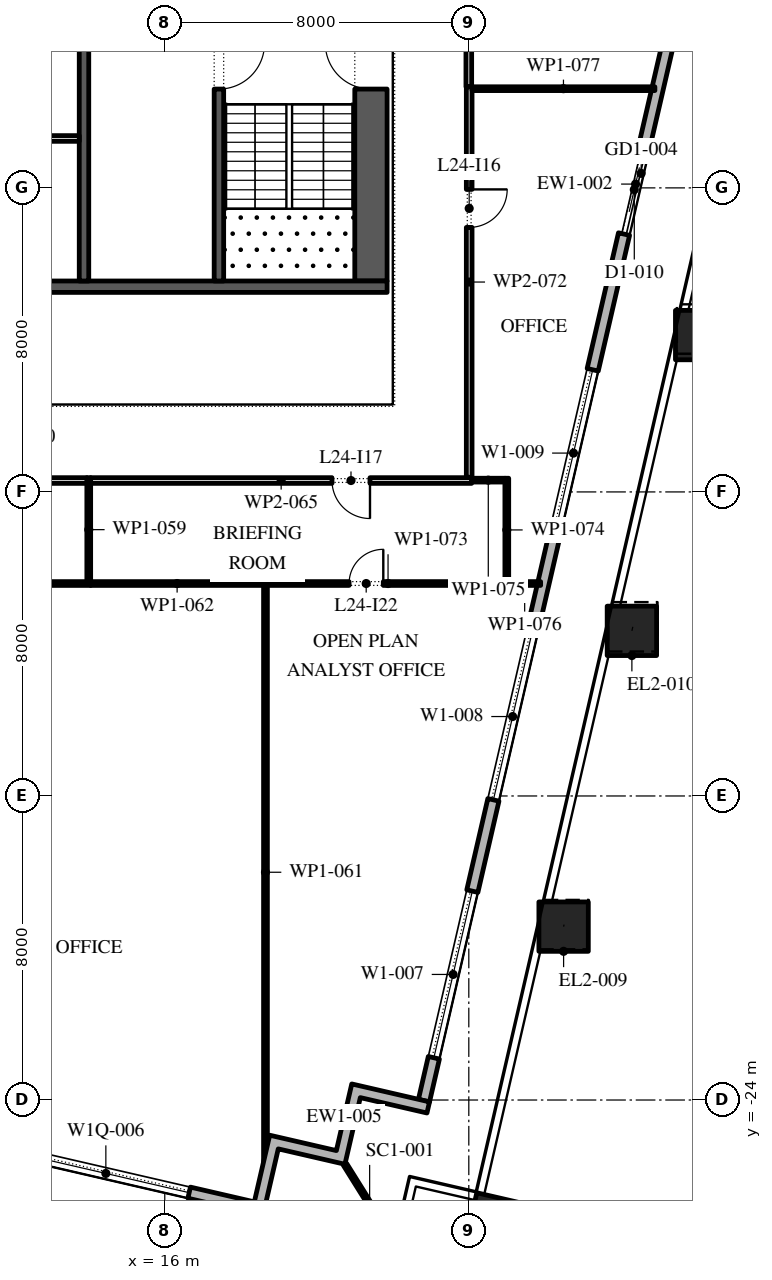
"""IFC4 building model, lengths in metres.
Left out: names, types, materials, properties, quantities, classifications, styles, units other than length and angle.
Written with IfcOpenShell. Run it as: python <this file> out.ifc"""

import sys

from ifc_helpers import new_model, si_unit, direction, frame, frame_2d, origin, origin_2d, place, context, subcontext, project, spatial, polyline, rectangle, outline, extrude, element, fill, save


model = new_model("IFC4")
c1 = context("Model", 3, precision=1e-05, world=origin(), true_north=direction((0.0, 1.0)))
c2 = subcontext(c1, "Body", "Model", "MODEL_VIEW")
j1 = project(units=[si_unit("LENGTHUNIT", "METRE"), si_unit("PLANEANGLEUNIT", "RADIAN")], contexts=[c1])
p1 = place(None, origin())
s1 = spatial("IfcSite", under=j1, at=p1, CompositionType="ELEMENT")
p2 = place(p1, origin())
s2 = spatial("IfcBuilding", under=s1, at=p2, CompositionType="ELEMENT")
p3 = place(p2, frame((0.0, 0.0, 114.0)))
s3 = spatial("IfcBuildingStorey", under=s2, at=p3, CompositionType="ELEMENT", Elevation=114.0)
p4 = place(p3, frame((24.698, -27.22, 0.0), z_axis=(0.0, 0.0, 1.0), x_axis=(0.974370064785, -0.224951054344, 0.0)))
e1 = element("IfcColumn", 1, at=p4, inside=s3, PredefinedType="COLUMN", context=c2, shape_type="SweptSolid", body=[
    extrude(rectangle(XDim=1.3, YDim=1.3, at=origin_2d()), origin(), (0.0, 0.0, 1.0), 4.2),
])
p5 = place(p3, frame((26.494, -19.438, 0.0), z_axis=(0.002906224189, 0.012671137464, 0.999915494498), x_axis=(-0.974691740237, 0.22355315143, 0.0)))
e2 = element("IfcColumn", 2, at=p5, inside=s3, PredefinedType="COLUMN", context=c2, shape_type="SweptSolid", body=[
    extrude(rectangle(XDim=1.3, YDim=1.3, at=origin_2d()), origin(), (0.0, 0.0, 1.0), 4.2),
])
p6 = place(p3, frame((28.291, -11.656, 0.0), z_axis=(0.005869083212, 0.025335844359, 0.999661767226), x_axis=(-0.974202561131, 0.225675363932, 0.0)))
e3 = element("IfcColumn", 3, at=p6, inside=s3, PredefinedType="COLUMN", context=c2, shape_type="SweptSolid", body=[
    extrude(rectangle(XDim=1.3, YDim=1.3, at=origin_2d()), origin(), (0.0, 0.0, 1.0), 4.201),
])
p7 = place(p3, frame((30.088, -3.873, 0.0), z_axis=(0.008770884695, 0.037929719907, 0.99924191662), x_axis=(-0.974290512438, 0.225295355862, 0.0)))
e4 = element("IfcColumn", 4, at=p7, inside=s3, PredefinedType="COLUMN", context=c2, shape_type="SweptSolid", body=[
    extrude(rectangle(XDim=1.3, YDim=1.3, at=origin_2d()), origin(), (0.0, 0.0, 1.0), 4.203),
])
p8 = place(p3, frame((-31.078, -15.421, 0.0), z_axis=(0.0, 0.0, 1.0), x_axis=(0.974370456532, -0.224949357493, 0.0)))
e5 = element("IfcWall", 5, at=p8, inside=s3, PredefinedType="STANDARD", context=c2, shape_type="SweptSolid", body=[
    extrude(rectangle(XDim=51.0, YDim=0.3, at=frame_2d((25.5, 0.0))), origin(), (0.0, 0.0, 1.0), 4.0),
])
p9 = place(p8, frame((1.875, 0.0, 0.45)))
e6 = element("IfcOpeningElement", 6, at=p9, cuts=e5, PredefinedType="OPENING", context=c2, shape_type="SweptSolid", body=[
    extrude(rectangle(XDim=4.5, YDim=2.65, at=frame_2d((2.25, 1.325))), frame((0.0, 0.16, 0.0), z_axis=(0.0, -1.0, 0.0), x_axis=(1.0, 0.0, 0.0)), (0.0, 0.0, 1.0), 0.32),
])
p10 = place(p8, frame((10.275, 0.0, 0.45)))
e7 = element("IfcOpeningElement", 7, at=p10, cuts=e5, PredefinedType="OPENING", context=c2, shape_type="SweptSolid", body=[
    extrude(rectangle(XDim=4.5, YDim=2.525, at=frame_2d((2.25, 1.262))), frame((0.0, 0.16, 0.0), z_axis=(0.0, -1.0, 0.0), x_axis=(1.0, 0.0, 0.0)), (0.0, 0.0, 1.0), 0.32),
])
p11 = place(p8, frame((18.825, 0.0, 0.45)))
e8 = element("IfcOpeningElement", 8, at=p11, cuts=e5, PredefinedType="OPENING", context=c2, shape_type="SweptSolid", body=[
    extrude(rectangle(XDim=4.5, YDim=2.5, at=frame_2d((2.25, 1.25))), frame((0.0, 0.16, 0.0), z_axis=(0.0, -1.0, 0.0), x_axis=(1.0, 0.0, 0.0)), (0.0, 0.0, 1.0), 0.32),
])
p12 = place(p8, frame((27.075, 0.0, 0.0)))
e9 = element("IfcOpeningElement", 9, at=p12, cuts=e5, PredefinedType="OPENING", context=c2, shape_type="SweptSolid", body=[
    extrude(rectangle(XDim=2.4, YDim=2.9, at=frame_2d((1.2, 1.45))), frame((0.0, 0.16, 0.0), z_axis=(0.0, -1.0, 0.0), x_axis=(1.0, 0.0, 0.0)), (0.0, 0.0, 1.0), 0.32),
])
p13 = place(p8, frame((35.925, 0.0, 0.45)))
e10 = element("IfcOpeningElement", 10, at=p13, cuts=e5, PredefinedType="OPENING", context=c2, shape_type="SweptSolid", body=[
    extrude(rectangle(XDim=4.5, YDim=2.45, at=frame_2d((2.25, 1.225))), frame((0.0, 0.16, 0.0), z_axis=(0.0, -1.0, 0.0), x_axis=(1.0, 0.0, 0.0)), (0.0, 0.0, 1.0), 0.32),
])
p14 = place(p8, frame((44.475, 0.0, 0.45)))
e11 = element("IfcOpeningElement", 11, at=p14, cuts=e5, PredefinedType="OPENING", context=c2, shape_type="SweptSolid", body=[
    extrude(rectangle(XDim=4.5, YDim=2.45, at=frame_2d((2.25, 1.225))), frame((0.0, 0.16, 0.0), z_axis=(0.0, -1.0, 0.0), x_axis=(1.0, 0.0, 0.0)), (0.0, 0.0, 1.0), 0.32),
])
p15 = place(p3, frame((22.82, -24.016, 0.0), z_axis=(0.0, 0.0, 1.0), x_axis=(0.224953880882, 0.974369412223, 0.0)))
e12 = element("IfcWall", 12, at=p15, inside=s3, PredefinedType="STANDARD", context=c2, shape_type="SweptSolid", body=[
    extrude(rectangle(XDim=49.5, YDim=0.3, at=frame_2d((24.75, 0.0))), origin(), (0.0, 0.0, 1.0), 4.0),
])
p16 = place(p15, frame((1.157, 0.0, 0.45)))
e13 = element("IfcOpeningElement", 13, at=p16, cuts=e12, PredefinedType="OPENING", context=c2, shape_type="SweptSolid", body=[
    extrude(rectangle(XDim=4.5, YDim=3.05, at=frame_2d((2.25, 1.525))), frame((0.0, 0.16, 0.0), z_axis=(0.0, -1.0, 0.0), x_axis=(1.0, 0.0, 0.0)), (0.0, 0.0, 1.0), 0.32),
])
p17 = place(p15, frame((8.121, 0.0, 0.45)))
e14 = element("IfcOpeningElement", 14, at=p17, cuts=e12, PredefinedType="OPENING", context=c2, shape_type="SweptSolid", body=[
    extrude(rectangle(XDim=4.5, YDim=3.05, at=frame_2d((2.25, 1.525))), frame((0.0, 0.16, 0.0), z_axis=(0.0, -1.0, 0.0), x_axis=(1.0, 0.0, 0.0)), (0.0, 0.0, 1.0), 0.32),
])
p18 = place(p15, frame((15.236, 0.0, 0.45)))
e15 = element("IfcOpeningElement", 15, at=p18, cuts=e12, PredefinedType="OPENING", context=c2, shape_type="SweptSolid", body=[
    extrude(rectangle(XDim=4.5, YDim=3.05, at=frame_2d((2.25, 1.525))), frame((0.0, 0.16, 0.0), z_axis=(0.0, -1.0, 0.0), x_axis=(1.0, 0.0, 0.0)), (0.0, 0.0, 1.0), 0.32),
])
p19 = place(p15, frame((23.4, 0.0, 0.0)))
e16 = element("IfcOpeningElement", 16, at=p19, cuts=e12, PredefinedType="OPENING", context=c2, shape_type="SweptSolid", body=[
    extrude(rectangle(XDim=2.4, YDim=3.5, at=frame_2d((1.2, 1.75))), frame((0.0, 0.16, 0.0), z_axis=(0.0, -1.0, 0.0), x_axis=(1.0, 0.0, 0.0)), (0.0, 0.0, 1.0), 0.32),
])
p20 = place(p15, frame((29.464, 0.0, 0.45)))
e17 = element("IfcOpeningElement", 17, at=p20, cuts=e12, PredefinedType="OPENING", context=c2, shape_type="SweptSolid", body=[
    extrude(rectangle(XDim=4.5, YDim=2.875, at=frame_2d((2.25, 1.438))), frame((0.0, 0.16, 0.0), z_axis=(0.0, -1.0, 0.0), x_axis=(1.0, 0.0, 0.0)), (0.0, 0.0, 1.0), 0.32),
])
p21 = place(p15, frame((36.579, 0.0, 0.45)))
e18 = element("IfcOpeningElement", 18, at=p21, cuts=e12, PredefinedType="OPENING", context=c2, shape_type="SweptSolid", body=[
    extrude(rectangle(XDim=4.5, YDim=2.825, at=frame_2d((2.25, 1.413))), frame((0.0, 0.16, 0.0), z_axis=(0.0, -1.0, 0.0), x_axis=(1.0, 0.0, 0.0)), (0.0, 0.0, 1.0), 0.32),
])
p22 = place(p15, frame((43.693, 0.0, 0.45)))
e19 = element("IfcOpeningElement", 19, at=p22, cuts=e12, PredefinedType="OPENING", context=c2, shape_type="SweptSolid", body=[
    extrude(rectangle(XDim=4.5, YDim=2.75, at=frame_2d((2.25, 1.375))), frame((0.0, 0.16, 0.0), z_axis=(0.0, -1.0, 0.0), x_axis=(1.0, 0.0, 0.0)), (0.0, 0.0, 1.0), 0.32),
])
p23 = place(p3, origin())
e20 = element("IfcWall", 20, at=p23, inside=s3, PredefinedType="STANDARD", context=c2, shape_type="SweptSolid", body=[
    extrude(outline(polyline([(20.515, -25.331), (20.92, -23.577), (22.967, -24.049), (22.899, -24.342), (21.145, -23.937), (20.74, -25.691), (18.986, -25.286), (18.649, -26.747), (18.357, -26.68), (18.762, -24.926), (20.515, -25.331)])), origin(), (0.0, 0.0, 1.0), 4.0),
])
p24 = place(p3, frame((20.74, -25.691, -0.05), z_axis=(0.0, 0.0, 1.0), x_axis=(0.529972121605, -0.848015064914, 0.0)))
e21 = element("IfcWall", 21, at=p24, inside=s3, PredefinedType="STANDARD", context=c2, shape_type="SweptSolid", body=[
    extrude(rectangle(XDim=2.455, YDim=0.1, at=frame_2d((1.228, 0.0))), origin(), (0.0, 0.0, 1.0), 4.05),
])
p25 = place(p3, frame((21.425, -2.45, 0.0), z_axis=(0.0, 0.0, 1.0), x_axis=(0.0, 1.0, 0.0)))
e22 = element("IfcWall", 22, at=p25, inside=s3, PredefinedType="SHEAR", context=c2, shape_type="SweptSolid", body=[
    extrude(rectangle(XDim=27.9, YDim=0.85, at=frame_2d((13.95, 0.0))), origin(), (0.0, 0.0, 1.0), 4.0),
])
p26 = place(p25, frame((5.05, 0.0, 0.0)))
e23 = element("IfcOpeningElement", 23, at=p26, cuts=e22, PredefinedType="OPENING", context=c2, shape_type="SweptSolid", body=[
    extrude(rectangle(XDim=1.2, YDim=2.1, at=frame_2d((0.6, 1.05))), frame((0.0, 0.435, 0.0), z_axis=(0.0, -1.0, 0.0), x_axis=(1.0, 0.0, 0.0)), (0.0, 0.0, 1.0), 0.87),
])
p27 = place(p25, frame((21.65, 0.0, 0.0)))
e24 = element("IfcOpeningElement", 24, at=p27, cuts=e22, PredefinedType="OPENING", context=c2, shape_type="SweptSolid", body=[
    extrude(rectangle(XDim=1.2, YDim=2.1, at=frame_2d((0.6, 1.05))), frame((0.0, 0.435, 0.0), z_axis=(0.0, -1.0, 0.0), x_axis=(1.0, 0.0, 0.0)), (0.0, 0.0, 1.0), 0.87),
])
p28 = place(p3, frame((10.15, -2.6, 0.0), z_axis=(0.0, 0.0, 1.0), x_axis=(1.0, 0.0, 0.0)))
e25 = element("IfcWall", 25, at=p28, inside=s3, PredefinedType="SHEAR", context=c2, shape_type="SweptSolid", body=[
    extrude(rectangle(XDim=11.7, YDim=0.3, at=frame_2d((5.85, 0.0))), origin(), (0.0, 0.0, 1.0), 4.0),
])
p29 = place(p3, frame((17.425, -2.45, 0.0), z_axis=(0.0, 0.0, 1.0), x_axis=(0.0, 1.0, 0.0)))
e26 = element("IfcWall", 26, at=p29, inside=s3, PredefinedType="SHEAR", context=c2, shape_type="SweptSolid", body=[
    extrude(rectangle(XDim=6.3, YDim=0.25, at=frame_2d((3.15, 0.0))), origin(), (0.0, 0.0, 1.0), 4.0),
])
p30 = place(p29, frame((5.05, 0.0, 0.0)))
e27 = element("IfcOpeningElement", 27, at=p30, cuts=e26, PredefinedType="OPENING", context=c2, shape_type="SweptSolid", body=[
    extrude(rectangle(XDim=1.2, YDim=2.1, at=frame_2d((0.6, 1.05))), frame((0.0, 0.135, 0.0), z_axis=(0.0, -1.0, 0.0), x_axis=(1.0, 0.0, 0.0)), (0.0, 0.0, 1.0), 0.27),
])
p31 = place(p3, frame((13.875, -2.45, 0.0), z_axis=(0.0, 0.0, 1.0), x_axis=(0.0, 1.0, 0.0)))
e28 = element("IfcWall", 28, at=p31, inside=s3, PredefinedType="SHEAR", context=c2, shape_type="SweptSolid", body=[
    extrude(rectangle(XDim=21.3, YDim=0.25, at=frame_2d((10.65, 0.0))), origin(), (0.0, 0.0, 1.0), 4.0),
])
p32 = place(p31, frame((11.446, 0.0, 0.0)))
e29 = element("IfcOpeningElement", 29, at=p32, cuts=e28, PredefinedType="OPENING", context=c2, shape_type="SweptSolid", body=[
    extrude(rectangle(XDim=0.9, YDim=2.1, at=frame_2d((0.45, 1.05))), frame((0.0, 0.135, 0.0), z_axis=(0.0, -1.0, 0.0), x_axis=(1.0, 0.0, 0.0)), (0.0, 0.0, 1.0), 0.27),
])
p33 = place(p31, frame((17.725, 0.0, 0.0)))
e30 = element("IfcOpeningElement", 30, at=p33, cuts=e28, PredefinedType="OPENING", context=c2, shape_type="SweptSolid", body=[
    extrude(rectangle(XDim=0.9, YDim=2.1, at=frame_2d((0.45, 1.05))), frame((0.0, 0.135, 0.0), z_axis=(0.0, -1.0, 0.0), x_axis=(1.0, 0.0, 0.0)), (0.0, 0.0, 1.0), 0.27),
])
p34 = place(p31, frame((6.971, 0.0, 0.0)))
e31 = element("IfcOpeningElement", 31, at=p34, cuts=e28, PredefinedType="OPENING", context=c2, shape_type="SweptSolid", body=[
    extrude(rectangle(XDim=1.1, YDim=2.1, at=frame_2d((0.55, 1.05))), frame((0.0, 0.135, 0.0), z_axis=(0.0, -1.0, 0.0), x_axis=(1.0, 0.0, 0.0)), (0.0, 0.0, 1.0), 0.27),
])
p35 = place(p3, frame((11.0, 1.3, 0.0), z_axis=(0.0, 0.0, 1.0), x_axis=(1.0, 0.0, 0.0)))
e32 = element("IfcWall", 32, at=p35, inside=s3, PredefinedType="PARTITIONING", context=c2, shape_type="SweptSolid", body=[
    extrude(rectangle(XDim=2.75, YDim=0.15, at=frame_2d((1.375, 0.0))), origin(), (0.0, 0.0, 1.0), 4.0),
])
p36 = place(p3, frame((14.05, -10.41, 0.0), z_axis=(0.0, 0.0, 1.0), x_axis=(-1.0, 0.0, 0.0)))
e33 = element("IfcWall", 33, at=p36, inside=s3, PredefinedType="PARTITIONING", context=c2, shape_type="SweptSolid", body=[
    extrude(rectangle(XDim=7.66, YDim=0.1, at=frame_2d((3.83, 0.0))), origin(), (0.0, 0.0, 1.0), 4.0),
])
p37 = place(p36, frame((3.86, 0.0, 0.0)))
e34 = element("IfcOpeningElement", 34, at=p37, cuts=e33, PredefinedType="OPENING", context=c2, shape_type="SweptSolid", body=[
    extrude(rectangle(XDim=1.6, YDim=2.1, at=frame_2d((0.8, 1.05))), frame((0.0, 0.06, 0.0), z_axis=(0.0, -1.0, 0.0), x_axis=(1.0, 0.0, 0.0)), (0.0, 0.0, 1.0), 0.12),
])
p38 = place(p3, frame((14.0, -10.36, 0.0), z_axis=(0.0, 0.0, 1.0), x_axis=(0.0, 1.0, 0.0)))
e35 = element("IfcWall", 35, at=p38, inside=s3, PredefinedType="PARTITIONING", context=c2, shape_type="SweptSolid", body=[
    extrude(rectangle(XDim=2.735, YDim=0.1, at=frame_2d((1.368, 0.0))), origin(), (0.0, 0.0, 1.0), 4.0),
])
p39 = place(p3, frame((13.95, -7.7, 0.0), z_axis=(0.0, 0.0, 1.0), x_axis=(-1.0, 0.0, 0.0)))
e36 = element("IfcWall", 36, at=p39, inside=s3, PredefinedType="PARTITIONING", context=c2, shape_type="SweptSolid", body=[
    extrude(rectangle(XDim=5.875, YDim=0.15, at=frame_2d((2.938, 0.0))), origin(), (0.0, 0.0, 1.0), 4.0),
])
p40 = place(p3, frame((18.65, -25.654, 0.0), z_axis=(0.0, 0.0, 1.0), x_axis=(0.0, 1.0, 0.0)))
e37 = element("IfcWall", 37, at=p40, inside=s3, PredefinedType="PARTITIONING", context=c2, shape_type="SweptSolid", body=[
    extrude(rectangle(XDim=15.294, YDim=0.1, at=frame_2d((7.647, 0.0))), origin(), (0.0, 0.0, 1.0), 4.0),
])
p41 = place(p3, frame((18.6, -10.41, 0.0), z_axis=(0.0, 0.0, 1.0), x_axis=(-1.0, 0.0, 0.0)))
e38 = element("IfcWall", 38, at=p41, inside=s3, PredefinedType="PARTITIONING", context=c2, shape_type="SweptSolid", body=[
    extrude(rectangle(XDim=4.55, YDim=0.1, at=frame_2d((2.275, 0.0))), origin(), (0.0, 0.0, 1.0), 4.0),
])
p42 = place(p3, frame((24.075, -7.7, 0.0), z_axis=(0.0, 0.0, 1.0), x_axis=(-1.0, 0.0, 0.0)))
e39 = element("IfcWall", 39, at=p42, inside=s3, PredefinedType="PARTITIONING", context=c2, shape_type="SweptSolid", body=[
    extrude(rectangle(XDim=10.025, YDim=0.15, at=frame_2d((5.012, 0.0))), origin(), (0.0, 0.0, 1.0), 4.0),
])
p43 = place(p42, frame((2.675, 0.0, 0.0)))
e40 = element("IfcOpeningElement", 40, at=p43, cuts=e39, PredefinedType="OPENING", context=c2, shape_type="SweptSolid", body=[
    extrude(rectangle(XDim=1.0, YDim=2.1, at=frame_2d((0.5, 1.05))), frame((0.0, 0.085, 0.0), z_axis=(0.0, -1.0, 0.0), x_axis=(1.0, 0.0, 0.0)), (0.0, 0.0, 1.0), 0.17),
])
p44 = place(p3, frame((24.0, 9.5, 0.0), z_axis=(0.0, 0.0, 1.0), x_axis=(0.0, -1.0, 0.0)))
e41 = element("IfcWall", 41, at=p44, inside=s3, PredefinedType="PARTITIONING", context=c2, shape_type="SweptSolid", body=[
    extrude(rectangle(XDim=6.84, YDim=0.15, at=frame_2d((3.42, 0.0))), origin(), (0.0, 0.0, 1.0), 4.0),
])
p45 = place(p44, frame((4.24, 0.0, 0.0)))
e42 = element("IfcOpeningElement", 42, at=p45, cuts=e41, PredefinedType="OPENING", context=c2, shape_type="SweptSolid", body=[
    extrude(rectangle(XDim=1.0, YDim=2.1, at=frame_2d((0.5, 1.05))), frame((0.0, 0.085, 0.0), z_axis=(0.0, -1.0, 0.0), x_axis=(1.0, 0.0, 0.0)), (0.0, 0.0, 1.0), 0.17),
])
p46 = place(p3, frame((24.01, 2.66, 0.0), z_axis=(0.0, 0.0, 1.0), x_axis=(0.0, -1.0, 0.0)))
e43 = element("IfcWall", 43, at=p46, inside=s3, PredefinedType="PARTITIONING", context=c2, shape_type="SweptSolid", body=[
    extrude(rectangle(XDim=10.275, YDim=0.15, at=frame_2d((5.137, 0.0))), origin(), (0.0, 0.0, 1.0), 4.0),
])
p47 = place(p46, frame((2.7, 0.0, 0.0)))
e44 = element("IfcOpeningElement", 44, at=p47, cuts=e43, PredefinedType="OPENING", context=c2, shape_type="SweptSolid", body=[
    extrude(rectangle(XDim=1.0, YDim=2.1, at=frame_2d((0.5, 1.05))), frame((0.0, 0.085, 0.0), z_axis=(0.0, -1.0, 0.0), x_axis=(1.0, 0.0, 0.0)), (0.0, 0.0, 1.0), 0.17),
])
p48 = place(p3, frame((25.05, -10.41, 0.0), z_axis=(0.0, 0.0, 1.0), x_axis=(-1.0, 0.0, 0.0)))
e45 = element("IfcWall", 45, at=p48, inside=s3, PredefinedType="PARTITIONING", context=c2, shape_type="SweptSolid", body=[
    extrude(rectangle(XDim=6.35, YDim=0.1, at=frame_2d((3.175, 0.0))), origin(), (0.0, 0.0, 1.0), 4.0),
])
p49 = place(p48, frame((3.3, 0.0, 0.0)))
e46 = element("IfcOpeningElement", 46, at=p49, cuts=e45, PredefinedType="OPENING", context=c2, shape_type="SweptSolid", body=[
    extrude(rectangle(XDim=0.9, YDim=2.1, at=frame_2d((0.45, 1.05))), frame((0.0, 0.06, 0.0), z_axis=(0.0, -1.0, 0.0), x_axis=(1.0, 0.0, 0.0)), (0.0, 0.0, 1.0), 0.12),
])
p50 = place(p3, frame((25.0, -10.36, 0.0), z_axis=(0.0, 0.0, 1.0), x_axis=(0.0, 1.0, 0.0)))
e47 = element("IfcWall", 47, at=p50, inside=s3, PredefinedType="PARTITIONING", context=c2, shape_type="SweptSolid", body=[
    extrude(rectangle(XDim=2.72, YDim=0.1, at=frame_2d((1.36, 0.0))), origin(), (0.0, 0.0, 1.0), 4.0),
])
p51 = place(p3, frame((24.95, -7.69, 0.0), z_axis=(0.0, 0.0, 1.0), x_axis=(-1.0, 0.0, 0.0)))
e48 = element("IfcWall", 48, at=p51, inside=s3, PredefinedType="PARTITIONING", context=c2, shape_type="SweptSolid", body=[
    extrude(rectangle(XDim=0.875, YDim=0.1, at=frame_2d((0.438, 0.0))), origin(), (0.0, 0.0, 1.0), 4.0),
])
p52 = place(p3, frame((25.89, -10.41, 0.0), z_axis=(0.0, 0.0, 1.0), x_axis=(-1.0, 0.0, 0.0)))
e49 = element("IfcWall", 49, at=p52, inside=s3, PredefinedType="PARTITIONING", context=c2, shape_type="SweptSolid", body=[
    extrude(rectangle(XDim=0.84, YDim=0.1, at=frame_2d((0.42, 0.0))), origin(), (0.0, 0.0, 1.0), 4.0),
])
p53 = place(p3, frame((28.896, 2.61, 0.0), z_axis=(0.0, 0.0, 1.0), x_axis=(-1.0, 0.0, 0.0)))
e50 = element("IfcWall", 50, at=p53, inside=s3, PredefinedType="PARTITIONING", context=c2, shape_type="SweptSolid", body=[
    extrude(rectangle(XDim=4.811, YDim=0.1, at=frame_2d((2.406, 0.0))), origin(), (0.0, 0.0, 1.0), 4.0),
])
p54 = place(p14, origin())
e51 = element("IfcWindow", 51, at=p54, inside=s3, PartitioningType="DOUBLE_PANEL_VERTICAL", PredefinedType="WINDOW", context=c2, shape_type="SweptSolid", body=[
    extrude(rectangle(XDim=4.5, YDim=2.45, at=frame_2d((2.25, 1.225))), frame((0.0, 0.03, 0.0), z_axis=(0.0, -1.0, 0.0), x_axis=(1.0, 0.0, 0.0)), (0.0, 0.0, 1.0), 0.06),
])
fill(e11, e51)
p55 = place(p16, origin())
e52 = element("IfcWindow", 52, at=p55, inside=s3, PartitioningType="DOUBLE_PANEL_VERTICAL", PredefinedType="WINDOW", context=c2, shape_type="SweptSolid", body=[
    extrude(rectangle(XDim=4.5, YDim=3.05, at=frame_2d((2.25, 1.525))), frame((0.0, 0.03, 0.0), z_axis=(0.0, -1.0, 0.0), x_axis=(1.0, 0.0, 0.0)), (0.0, 0.0, 1.0), 0.06),
])
fill(e13, e52)
p56 = place(p17, origin())
e53 = element("IfcWindow", 53, at=p56, inside=s3, PartitioningType="DOUBLE_PANEL_VERTICAL", PredefinedType="WINDOW", context=c2, shape_type="SweptSolid", body=[
    extrude(rectangle(XDim=4.5, YDim=3.05, at=frame_2d((2.25, 1.525))), frame((0.0, 0.03, 0.0), z_axis=(0.0, -1.0, 0.0), x_axis=(1.0, 0.0, 0.0)), (0.0, 0.0, 1.0), 0.06),
])
fill(e14, e53)
p57 = place(p18, origin())
e54 = element("IfcWindow", 54, at=p57, inside=s3, PartitioningType="DOUBLE_PANEL_VERTICAL", PredefinedType="WINDOW", context=c2, shape_type="SweptSolid", body=[
    extrude(rectangle(XDim=4.5, YDim=3.05, at=frame_2d((2.25, 1.525))), frame((0.0, 0.03, 0.0), z_axis=(0.0, -1.0, 0.0), x_axis=(1.0, 0.0, 0.0)), (0.0, 0.0, 1.0), 0.06),
])
fill(e15, e54)
p58 = place(p19, origin())
e55 = element("IfcDoor", 55, at=p58, inside=s3, OperationType="DOUBLE_DOOR_SLIDING", PredefinedType="DOOR", context=c2, shape_type="SweptSolid", body=[
    extrude(rectangle(XDim=2.4, YDim=3.5, at=frame_2d((1.2, 1.75))), frame((0.0, 0.025, 0.0), z_axis=(0.0, -1.0, 0.0), x_axis=(1.0, 0.0, 0.0)), (0.0, 0.0, 1.0), 0.05),
])
fill(e16, e55)
p59 = place(p30, frame((1.2, 0.0, 0.0), z_axis=(0.0, 0.0, 1.0), x_axis=(-1.0, 0.0, 0.0)))
e56 = element("IfcDoor", 56, at=p59, inside=s3, OperationType="SINGLE_SWING_RIGHT", PredefinedType="DOOR", context=c2, shape_type="SweptSolid", body=[
    extrude(rectangle(XDim=1.2, YDim=2.1, at=frame_2d((0.6, 1.05))), frame((0.0, 0.025, 0.0), z_axis=(0.0, -1.0, 0.0), x_axis=(1.0, 0.0, 0.0)), (0.0, 0.0, 1.0), 0.05),
])
fill(e27, e56)
p60 = place(p26, origin())
e57 = element("IfcDoor", 57, at=p60, inside=s3, OperationType="SINGLE_SWING_LEFT", PredefinedType="DOOR", context=c2, shape_type="SweptSolid", body=[
    extrude(rectangle(XDim=1.2, YDim=2.1, at=frame_2d((0.6, 1.05))), frame((0.0, 0.025, 0.0), z_axis=(0.0, -1.0, 0.0), x_axis=(1.0, 0.0, 0.0)), (0.0, 0.0, 1.0), 0.05),
])
fill(e23, e57)
p61 = place(p47, origin())
e58 = element("IfcDoor", 58, at=p61, inside=s3, OperationType="SINGLE_SWING_RIGHT", PredefinedType="DOOR", context=c2, shape_type="SweptSolid", body=[
    extrude(rectangle(XDim=1.0, YDim=2.1, at=frame_2d((0.5, 1.05))), frame((0.0, 0.025, 0.0), z_axis=(0.0, -1.0, 0.0), x_axis=(1.0, 0.0, 0.0)), (0.0, 0.0, 1.0), 0.05),
])
fill(e44, e58)
p62 = place(p43, origin())
e59 = element("IfcDoor", 59, at=p62, inside=s3, OperationType="SINGLE_SWING_RIGHT", PredefinedType="DOOR", context=c2, shape_type="SweptSolid", body=[
    extrude(rectangle(XDim=1.0, YDim=2.1, at=frame_2d((0.5, 1.05))), frame((0.0, 0.025, 0.0), z_axis=(0.0, -1.0, 0.0), x_axis=(1.0, 0.0, 0.0)), (0.0, 0.0, 1.0), 0.05),
])
fill(e40, e59)
p63 = place(p49, frame((0.9, 0.0, 0.0), z_axis=(0.0, 0.0, 1.0), x_axis=(-1.0, 0.0, 0.0)))
e60 = element("IfcDoor", 60, at=p63, inside=s3, OperationType="SINGLE_SWING_LEFT", PredefinedType="DOOR", context=c2, shape_type="SweptSolid", body=[
    extrude(rectangle(XDim=0.9, YDim=2.1, at=frame_2d((0.45, 1.05))), frame((0.0, 0.025, 0.0), z_axis=(0.0, -1.0, 0.0), x_axis=(1.0, 0.0, 0.0)), (0.0, 0.0, 1.0), 0.05),
])
fill(e46, e60)
save(model, sys.argv[1])
